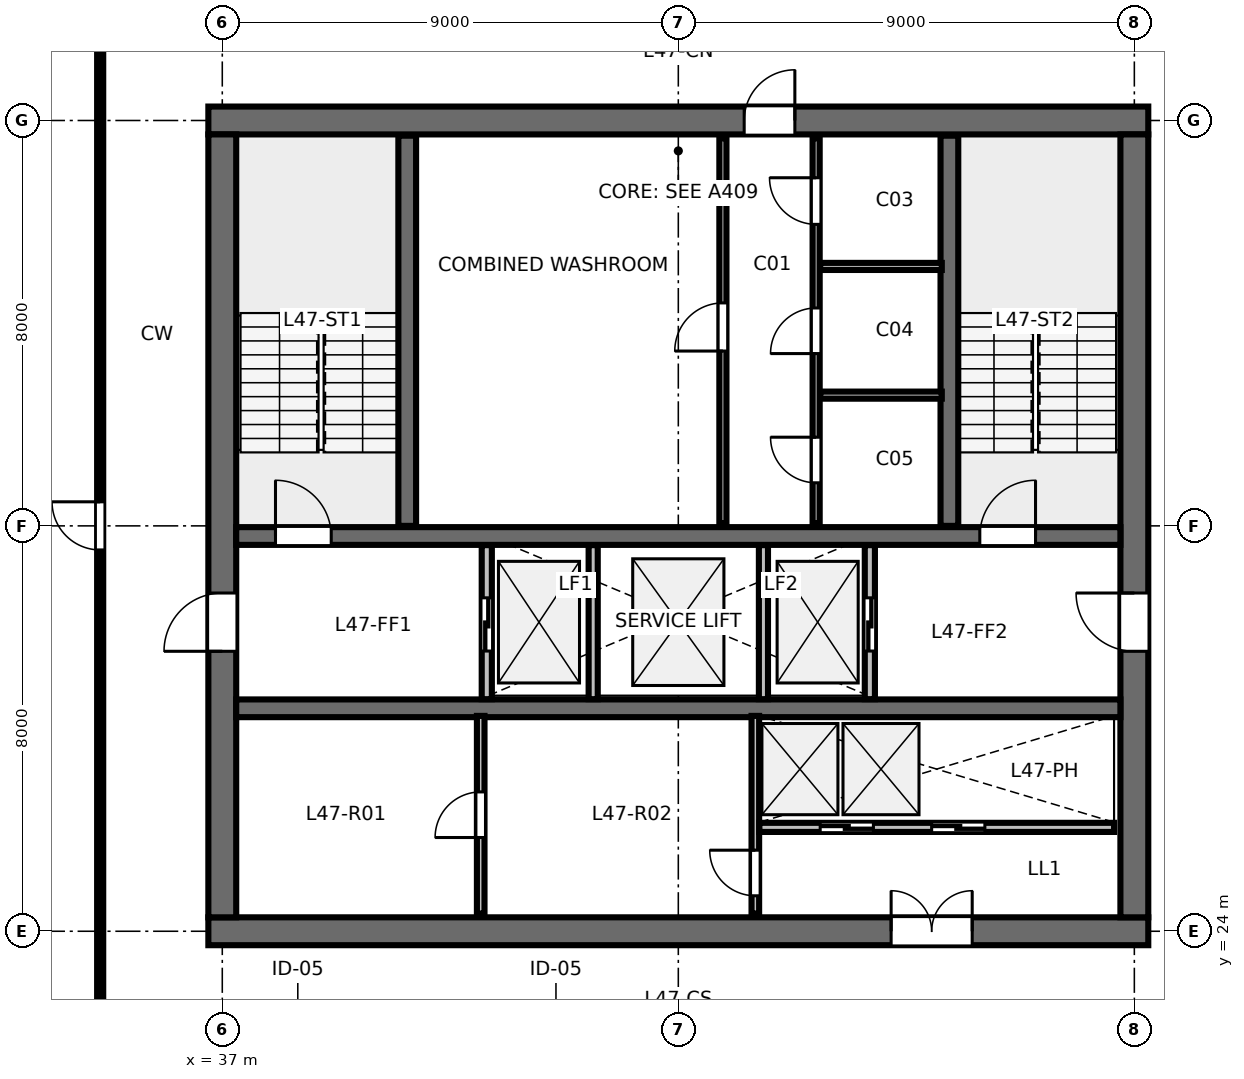
"""IFC4 building model, lengths in metres.
Left out: names, types, materials, properties, quantities, classifications, styles, units other than length and angle.
Written with IfcOpenShell. Run it as: python <this file> out.ifc"""

import sys

from ifc_helpers import new_model, si_unit, direction, frame, frame_2d, origin, place, context, subcontext, project, spatial, rectangle, extrude, element, fill, save


model = new_model("IFC4")
c1 = context("Model", 3, precision=1e-05, world=origin(), true_north=direction((0.0, 1.0)))
c2 = subcontext(c1, "Body", "Model", "MODEL_VIEW")
j1 = project(units=[si_unit("LENGTHUNIT", "METRE"), si_unit("PLANEANGLEUNIT", "RADIAN")], contexts=[c1])
p1 = place(None, origin())
s1 = spatial("IfcSite", under=j1, at=p1, CompositionType="ELEMENT")
p2 = place(p1, origin())
s2 = spatial("IfcBuilding", under=s1, at=p2, CompositionType="ELEMENT")
p3 = place(p2, frame((0.0, 0.0, 180.6)))
s3 = spatial("IfcBuildingStorey", under=s2, at=p3, CompositionType="ELEMENT", Elevation=180.6)
p4 = place(p3, frame((36.725, 24.0, 0.0), z_axis=(0.0, 0.0, 1.0), x_axis=(1.0, 0.0, 0.0)))
e1 = element("IfcWall", 1, at=p4, inside=s3, PredefinedType="SHEAR", context=c2, shape_type="SweptSolid", body=[
    extrude(rectangle(XDim=18.55, YDim=0.55, at=frame_2d((9.275, 0.0))), origin(), (0.0, 0.0, 1.0), 3.36),
])
p5 = place(p4, frame((13.475, 0.0, 0.0)))
e2 = element("IfcOpeningElement", 2, at=p5, cuts=e1, PredefinedType="OPENING", context=c2, shape_type="SweptSolid", body=[
    extrude(rectangle(XDim=1.6, YDim=2.15, at=frame_2d((0.8, 1.075))), frame((0.0, 0.285, 0.0), z_axis=(0.0, -1.0, 0.0), x_axis=(1.0, 0.0, 0.0)), (0.0, 0.0, 1.0), 0.57),
])
p6 = place(p3, frame((36.725, 40.0, 0.0), z_axis=(0.0, 0.0, 1.0), x_axis=(1.0, 0.0, 0.0)))
e3 = element("IfcWall", 3, at=p6, inside=s3, PredefinedType="SHEAR", context=c2, shape_type="SweptSolid", body=[
    extrude(rectangle(XDim=18.55, YDim=0.55, at=frame_2d((9.275, 0.0))), origin(), (0.0, 0.0, 1.0), 3.36),
])
p7 = place(p6, frame((10.575, 0.0, 0.0)))
e4 = element("IfcOpeningElement", 4, at=p7, cuts=e3, PredefinedType="OPENING", context=c2, shape_type="SweptSolid", body=[
    extrude(rectangle(XDim=1.0, YDim=2.15, at=frame_2d((0.5, 1.075))), frame((0.0, 0.285, 0.0), z_axis=(0.0, -1.0, 0.0), x_axis=(1.0, 0.0, 0.0)), (0.0, 0.0, 1.0), 0.57),
])
p8 = place(p3, frame((37.0, 24.275, 0.0), z_axis=(0.0, 0.0, 1.0), x_axis=(0.0, 1.0, 0.0)))
e5 = element("IfcWall", 5, at=p8, inside=s3, PredefinedType="SHEAR", context=c2, shape_type="SweptSolid", body=[
    extrude(rectangle(XDim=15.45, YDim=0.55, at=frame_2d((7.725, 0.0))), origin(), (0.0, 0.0, 1.0), 3.36),
])
p9 = place(p8, frame((5.25, 0.0, 0.0)))
e6 = element("IfcOpeningElement", 6, at=p9, cuts=e5, PredefinedType="OPENING", context=c2, shape_type="SweptSolid", body=[
    extrude(rectangle(XDim=1.15, YDim=2.15, at=frame_2d((0.575, 1.075))), frame((0.0, 0.285, 0.0), z_axis=(0.0, -1.0, 0.0), x_axis=(1.0, 0.0, 0.0)), (0.0, 0.0, 1.0), 0.57),
])
p10 = place(p3, frame((55.0, 24.275, 0.0), z_axis=(0.0, 0.0, 1.0), x_axis=(0.0, 1.0, 0.0)))
e7 = element("IfcWall", 7, at=p10, inside=s3, PredefinedType="SHEAR", context=c2, shape_type="SweptSolid", body=[
    extrude(rectangle(XDim=15.45, YDim=0.55, at=frame_2d((7.725, 0.0))), origin(), (0.0, 0.0, 1.0), 3.36),
])
p11 = place(p10, frame((5.25, 0.0, 0.0)))
e8 = element("IfcOpeningElement", 8, at=p11, cuts=e7, PredefinedType="OPENING", context=c2, shape_type="SweptSolid", body=[
    extrude(rectangle(XDim=1.15, YDim=2.15, at=frame_2d((0.575, 1.075))), frame((0.0, 0.285, 0.0), z_axis=(0.0, -1.0, 0.0), x_axis=(1.0, 0.0, 0.0)), (0.0, 0.0, 1.0), 0.57),
])
p12 = place(p3, frame((37.275, 31.8, 0.0), z_axis=(0.0, 0.0, 1.0), x_axis=(1.0, 0.0, 0.0)))
e9 = element("IfcWall", 9, at=p12, inside=s3, PredefinedType="SHEAR", context=c2, shape_type="SweptSolid", body=[
    extrude(rectangle(XDim=17.45, YDim=0.35, at=frame_2d((8.725, 0.0))), origin(), (0.0, 0.0, 1.0), 3.36),
])
p13 = place(p12, frame((0.775, 0.0, 0.0)))
e10 = element("IfcOpeningElement", 10, at=p13, cuts=e9, PredefinedType="OPENING", context=c2, shape_type="SweptSolid", body=[
    extrude(rectangle(XDim=1.1, YDim=2.15, at=frame_2d((0.55, 1.075))), frame((0.0, 0.185, 0.0), z_axis=(0.0, -1.0, 0.0), x_axis=(1.0, 0.0, 0.0)), (0.0, 0.0, 1.0), 0.37),
])
p14 = place(p12, frame((14.675, 0.0, 0.0)))
e11 = element("IfcOpeningElement", 11, at=p14, cuts=e9, PredefinedType="OPENING", context=c2, shape_type="SweptSolid", body=[
    extrude(rectangle(XDim=1.1, YDim=2.15, at=frame_2d((0.55, 1.075))), frame((0.0, 0.185, 0.0), z_axis=(0.0, -1.0, 0.0), x_axis=(1.0, 0.0, 0.0)), (0.0, 0.0, 1.0), 0.37),
])
p15 = place(p3, frame((37.275, 28.4, 0.0), z_axis=(0.0, 0.0, 1.0), x_axis=(1.0, 0.0, 0.0)))
e12 = element("IfcWall", 12, at=p15, inside=s3, PredefinedType="SHEAR", context=c2, shape_type="SweptSolid", body=[
    extrude(rectangle(XDim=17.45, YDim=0.35, at=frame_2d((8.725, 0.0))), origin(), (0.0, 0.0, 1.0), 3.36),
])
for number, where, z_axis, x_axis in (
    (13, (40.65, 32.0, 0.0), (0.0, 0.0, 1.0), (0.0, 1.0, 0.0)),
    (14, (51.35, 32.0, 0.0), (0.0, 0.0, 1.0), (0.0, 1.0, 0.0)),
):
    element("IfcWall", number, at=place(p3, frame(where, z_axis=z_axis, x_axis=x_axis)), inside=s3, PredefinedType="SHEAR", context=c2, shape_type="SweptSolid", body=[
        extrude(rectangle(XDim=7.7, YDim=0.35, at=frame_2d((3.85, 0.0))), origin(), (0.0, 0.0, 1.0), 3.6),
    ])
p16 = place(p3, frame((46.88, 32.05, 0.0), z_axis=(0.0, 0.0, 1.0), x_axis=(0.0, 1.0, 0.0)))
e15 = element("IfcWall", 15, at=p16, inside=s3, PredefinedType="PARTITIONING", context=c2, shape_type="SweptSolid", body=[
    extrude(rectangle(XDim=7.6, YDim=0.14, at=frame_2d((3.8, 0.0))), origin(), (0.0, 0.0, 1.0), 3.36),
])
p17 = place(p16, frame((3.4, 0.0, 0.0)))
e16 = element("IfcOpeningElement", 16, at=p17, cuts=e15, PredefinedType="OPENING", context=c2, shape_type="SweptSolid", body=[
    extrude(rectangle(XDim=0.95, YDim=2.15, at=frame_2d((0.475, 1.075))), frame((0.0, 0.08, 0.0), z_axis=(0.0, -1.0, 0.0), x_axis=(1.0, 0.0, 0.0)), (0.0, 0.0, 1.0), 0.16),
])
p18 = place(p3, frame((48.72, 32.05, 0.0), z_axis=(0.0, 0.0, 1.0), x_axis=(0.0, 1.0, 0.0)))
e17 = element("IfcWall", 17, at=p18, inside=s3, PredefinedType="PARTITIONING", context=c2, shape_type="SweptSolid", body=[
    extrude(rectangle(XDim=7.6, YDim=0.14, at=frame_2d((3.8, 0.0))), origin(), (0.0, 0.0, 1.0), 3.36),
])
p19 = place(p18, frame((0.8, 0.0, 0.0)))
e18 = element("IfcOpeningElement", 18, at=p19, cuts=e17, PredefinedType="OPENING", context=c2, shape_type="SweptSolid", body=[
    extrude(rectangle(XDim=0.9, YDim=2.15, at=frame_2d((0.45, 1.075))), frame((0.0, 0.08, 0.0), z_axis=(0.0, -1.0, 0.0), x_axis=(1.0, 0.0, 0.0)), (0.0, 0.0, 1.0), 0.16),
])
p20 = place(p18, frame((3.35, 0.0, 0.0)))
e19 = element("IfcOpeningElement", 19, at=p20, cuts=e17, PredefinedType="OPENING", context=c2, shape_type="SweptSolid", body=[
    extrude(rectangle(XDim=0.9, YDim=2.15, at=frame_2d((0.45, 1.075))), frame((0.0, 0.08, 0.0), z_axis=(0.0, -1.0, 0.0), x_axis=(1.0, 0.0, 0.0)), (0.0, 0.0, 1.0), 0.16),
])
p21 = place(p18, frame((5.9, 0.0, 0.0)))
e20 = element("IfcOpeningElement", 20, at=p21, cuts=e17, PredefinedType="OPENING", context=c2, shape_type="SweptSolid", body=[
    extrude(rectangle(XDim=0.92, YDim=2.15, at=frame_2d((0.46, 1.075))), frame((0.0, 0.08, 0.0), z_axis=(0.0, -1.0, 0.0), x_axis=(1.0, 0.0, 0.0)), (0.0, 0.0, 1.0), 0.16),
])
for number, where, z_axis, x_axis in (
    (21, (48.8, 34.58, 0.0), (0.0, 0.0, 1.0), (1.0, 0.0, 0.0)),
    (22, (48.8, 37.12, 0.0), (0.0, 0.0, 1.0), (1.0, 0.0, 0.0)),
):
    element("IfcWall", number, at=place(p3, frame(where, z_axis=z_axis, x_axis=x_axis)), inside=s3, PredefinedType="PARTITIONING", context=c2, shape_type="SweptSolid", body=[
        extrude(rectangle(XDim=2.4, YDim=0.14, at=frame_2d((1.2, 0.0))), origin(), (0.0, 0.0, 1.0), 3.36),
    ])
p22 = place(p3, frame((42.22, 28.58, 0.0), z_axis=(0.0, 0.0, 1.0), x_axis=(0.0, 1.0, 0.0)))
e23 = element("IfcWall", 23, at=p22, inside=s3, PredefinedType="PARTITIONING", context=c2, shape_type="SweptSolid", body=[
    extrude(rectangle(XDim=3.04, YDim=0.2, at=frame_2d((1.52, 0.0))), origin(), (0.0, 0.0, 1.0), 3.36),
])
p23 = place(p22, frame((0.95, 0.0, 0.0)))
e24 = element("IfcOpeningElement", 24, at=p23, cuts=e23, PredefinedType="OPENING", context=c2, shape_type="SweptSolid", body=[
    extrude(rectangle(XDim=1.05, YDim=2.15, at=frame_2d((0.525, 1.075))), frame((0.0, 0.11, 0.0), z_axis=(0.0, -1.0, 0.0), x_axis=(1.0, 0.0, 0.0)), (0.0, 0.0, 1.0), 0.22),
])
p24 = place(p3, frame((49.78, 28.58, 0.0), z_axis=(0.0, 0.0, 1.0), x_axis=(0.0, 1.0, 0.0)))
e25 = element("IfcWall", 25, at=p24, inside=s3, PredefinedType="PARTITIONING", context=c2, shape_type="SweptSolid", body=[
    extrude(rectangle(XDim=3.04, YDim=0.2, at=frame_2d((1.52, 0.0))), origin(), (0.0, 0.0, 1.0), 3.36),
])
p25 = place(p24, frame((0.95, 0.0, 0.0)))
e26 = element("IfcOpeningElement", 26, at=p25, cuts=e25, PredefinedType="OPENING", context=c2, shape_type="SweptSolid", body=[
    extrude(rectangle(XDim=1.05, YDim=2.15, at=frame_2d((0.525, 1.075))), frame((0.0, 0.11, 0.0), z_axis=(0.0, -1.0, 0.0), x_axis=(1.0, 0.0, 0.0)), (0.0, 0.0, 1.0), 0.22),
])
for number, where, z_axis, x_axis in (
    (27, (44.32, 28.58, 0.0), (0.0, 0.0, 1.0), (0.0, 1.0, 0.0)),
    (28, (47.68, 28.58, 0.0), (0.0, 0.0, 1.0), (0.0, 1.0, 0.0)),
):
    element("IfcWall", number, at=place(p3, frame(where, z_axis=z_axis, x_axis=x_axis)), inside=s3, PredefinedType="PARTITIONING", context=c2, shape_type="SweptSolid", body=[
        extrude(rectangle(XDim=3.04, YDim=0.18, at=frame_2d((1.52, 0.0))), origin(), (0.0, 0.0, 1.0), 3.36),
    ])
p26 = place(p3, frame((42.1, 24.35, 0.0), z_axis=(0.0, 0.0, 1.0), x_axis=(0.0, 1.0, 0.0)))
e29 = element("IfcWall", 29, at=p26, inside=s3, PredefinedType="PARTITIONING", context=c2, shape_type="SweptSolid", body=[
    extrude(rectangle(XDim=3.9, YDim=0.15, at=frame_2d((1.95, 0.0))), origin(), (0.0, 0.0, 1.0), 3.36),
])
p27 = place(p26, frame((1.5, 0.0, 0.0)))
e30 = element("IfcOpeningElement", 30, at=p27, cuts=e29, PredefinedType="OPENING", context=c2, shape_type="SweptSolid", body=[
    extrude(rectangle(XDim=0.9, YDim=2.15, at=frame_2d((0.45, 1.075))), frame((0.0, 0.085, 0.0), z_axis=(0.0, -1.0, 0.0), x_axis=(1.0, 0.0, 0.0)), (0.0, 0.0, 1.0), 0.17),
])
p28 = place(p3, frame((47.52, 24.35, 0.0), z_axis=(0.0, 0.0, 1.0), x_axis=(0.0, 1.0, 0.0)))
e31 = element("IfcWall", 31, at=p28, inside=s3, PredefinedType="PARTITIONING", context=c2, shape_type="SweptSolid", body=[
    extrude(rectangle(XDim=3.9, YDim=0.15, at=frame_2d((1.95, 0.0))), origin(), (0.0, 0.0, 1.0), 3.36),
])
p29 = place(p28, frame((0.35, 0.0, 0.0)))
e32 = element("IfcOpeningElement", 32, at=p29, cuts=e31, PredefinedType="OPENING", context=c2, shape_type="SweptSolid", body=[
    extrude(rectangle(XDim=0.9, YDim=2.15, at=frame_2d((0.45, 1.075))), frame((0.0, 0.085, 0.0), z_axis=(0.0, -1.0, 0.0), x_axis=(1.0, 0.0, 0.0)), (0.0, 0.0, 1.0), 0.17),
])
p30 = place(p3, frame((47.6, 26.05, 0.0), z_axis=(0.0, 0.0, 1.0), x_axis=(1.0, 0.0, 0.0)))
e33 = element("IfcWall", 33, at=p30, inside=s3, PredefinedType="PARTITIONING", context=c2, shape_type="SweptSolid", body=[
    extrude(rectangle(XDim=7.0, YDim=0.18, at=frame_2d((3.5, 0.0))), origin(), (0.0, 0.0, 1.0), 3.36),
])
p31 = place(p30, frame((1.2, 0.0, 0.0)))
e34 = element("IfcOpeningElement", 34, at=p31, cuts=e33, PredefinedType="OPENING", context=c2, shape_type="SweptSolid", body=[
    extrude(rectangle(XDim=1.05, YDim=2.15, at=frame_2d((0.525, 1.075))), frame((0.0, 0.1, 0.0), z_axis=(0.0, -1.0, 0.0), x_axis=(1.0, 0.0, 0.0)), (0.0, 0.0, 1.0), 0.2),
])
p32 = place(p30, frame((3.4, 0.0, 0.0)))
e35 = element("IfcOpeningElement", 35, at=p32, cuts=e33, PredefinedType="OPENING", context=c2, shape_type="SweptSolid", body=[
    extrude(rectangle(XDim=1.05, YDim=2.15, at=frame_2d((0.525, 1.075))), frame((0.0, 0.1, 0.0), z_axis=(0.0, -1.0, 0.0), x_axis=(1.0, 0.0, 0.0)), (0.0, 0.0, 1.0), 0.2),
])
p33 = place(p3, frame((34.59, 21.65, 0.0), z_axis=(0.0, 0.0, 1.0), x_axis=(0.0, 1.0, 0.0)))
e36 = element("IfcWall", 36, at=p33, inside=s3, PredefinedType="PARTITIONING", context=c2, shape_type="SweptSolid", body=[
    extrude(rectangle(XDim=20.7, YDim=0.12, at=frame_2d((10.35, 0.0))), origin(), (0.0, 0.0, 1.0), 2.64),
])
p34 = place(p33, frame((9.875, 0.0, 0.0)))
e37 = element("IfcOpeningElement", 37, at=p34, cuts=e36, PredefinedType="OPENING", context=c2, shape_type="SweptSolid", body=[
    extrude(rectangle(XDim=0.95, YDim=2.15, at=frame_2d((0.475, 1.075))), frame((0.0, 0.07, 0.0), z_axis=(0.0, -1.0, 0.0), x_axis=(1.0, 0.0, 0.0)), (0.0, 0.0, 1.0), 0.14),
])
p35 = place(p13, origin())
e38 = element("IfcDoor", 38, at=p35, inside=s3, OperationType="SINGLE_SWING_LEFT", PredefinedType="DOOR", context=c2, shape_type="SweptSolid", body=[
    extrude(rectangle(XDim=1.1, YDim=2.15, at=frame_2d((0.55, 1.075))), frame((0.0, 0.025, 0.0), z_axis=(0.0, -1.0, 0.0), x_axis=(1.0, 0.0, 0.0)), (0.0, 0.0, 1.0), 0.05),
])
fill(e10, e38)
p36 = place(p14, origin())
e39 = element("IfcDoor", 39, at=p36, inside=s3, OperationType="SINGLE_SWING_RIGHT", PredefinedType="DOOR", context=c2, shape_type="SweptSolid", body=[
    extrude(rectangle(XDim=1.1, YDim=2.15, at=frame_2d((0.55, 1.075))), frame((0.0, 0.025, 0.0), z_axis=(0.0, -1.0, 0.0), x_axis=(1.0, 0.0, 0.0)), (0.0, 0.0, 1.0), 0.05),
])
fill(e11, e39)
p37 = place(p7, origin())
e40 = element("IfcDoor", 40, at=p37, inside=s3, OperationType="SINGLE_SWING_RIGHT", PredefinedType="DOOR", context=c2, shape_type="SweptSolid", body=[
    extrude(rectangle(XDim=1.0, YDim=2.15, at=frame_2d((0.5, 1.075))), frame((0.0, 0.025, 0.0), z_axis=(0.0, -1.0, 0.0), x_axis=(1.0, 0.0, 0.0)), (0.0, 0.0, 1.0), 0.05),
])
fill(e4, e40)
p38 = place(p9, origin())
e41 = element("IfcDoor", 41, at=p38, inside=s3, OperationType="SINGLE_SWING_LEFT", PredefinedType="DOOR", context=c2, shape_type="SweptSolid", body=[
    extrude(rectangle(XDim=1.15, YDim=2.15, at=frame_2d((0.575, 1.075))), frame((0.0, 0.025, 0.0), z_axis=(0.0, -1.0, 0.0), x_axis=(1.0, 0.0, 0.0)), (0.0, 0.0, 1.0), 0.05),
])
fill(e6, e41)
p39 = place(p11, origin())
e42 = element("IfcDoor", 42, at=p39, inside=s3, OperationType="SINGLE_SWING_RIGHT", PredefinedType="DOOR", context=c2, shape_type="SweptSolid", body=[
    extrude(rectangle(XDim=1.15, YDim=2.15, at=frame_2d((0.575, 1.075))), frame((0.0, 0.025, 0.0), z_axis=(0.0, -1.0, 0.0), x_axis=(1.0, 0.0, 0.0)), (0.0, 0.0, 1.0), 0.05),
])
fill(e8, e42)
p40 = place(p5, origin())
e43 = element("IfcDoor", 43, at=p40, inside=s3, OperationType="DOUBLE_DOOR_SINGLE_SWING", PredefinedType="DOOR", context=c2, shape_type="SweptSolid", body=[
    extrude(rectangle(XDim=1.6, YDim=2.15, at=frame_2d((0.8, 1.075))), frame((0.0, 0.025, 0.0), z_axis=(0.0, -1.0, 0.0), x_axis=(1.0, 0.0, 0.0)), (0.0, 0.0, 1.0), 0.05),
])
fill(e2, e43)
p41 = place(p17, origin())
e44 = element("IfcDoor", 44, at=p41, inside=s3, OperationType="SINGLE_SWING_LEFT", PredefinedType="DOOR", context=c2, shape_type="SweptSolid", body=[
    extrude(rectangle(XDim=0.95, YDim=2.15, at=frame_2d((0.475, 1.075))), frame((0.0, 0.025, 0.0), z_axis=(0.0, -1.0, 0.0), x_axis=(1.0, 0.0, 0.0)), (0.0, 0.0, 1.0), 0.05),
])
fill(e16, e44)
p42 = place(p19, origin())
e45 = element("IfcDoor", 45, at=p42, inside=s3, OperationType="SINGLE_SWING_RIGHT", PredefinedType="DOOR", context=c2, shape_type="SweptSolid", body=[
    extrude(rectangle(XDim=0.9, YDim=2.15, at=frame_2d((0.45, 1.075))), frame((0.0, 0.025, 0.0), z_axis=(0.0, -1.0, 0.0), x_axis=(1.0, 0.0, 0.0)), (0.0, 0.0, 1.0), 0.05),
])
fill(e18, e45)
p43 = place(p20, origin())
e46 = element("IfcDoor", 46, at=p43, inside=s3, OperationType="SINGLE_SWING_LEFT", PredefinedType="DOOR", context=c2, shape_type="SweptSolid", body=[
    extrude(rectangle(XDim=0.9, YDim=2.15, at=frame_2d((0.45, 1.075))), frame((0.0, 0.025, 0.0), z_axis=(0.0, -1.0, 0.0), x_axis=(1.0, 0.0, 0.0)), (0.0, 0.0, 1.0), 0.05),
])
fill(e19, e46)
p44 = place(p21, origin())
e47 = element("IfcDoor", 47, at=p44, inside=s3, OperationType="SINGLE_SWING_RIGHT", PredefinedType="DOOR", context=c2, shape_type="SweptSolid", body=[
    extrude(rectangle(XDim=0.92, YDim=2.15, at=frame_2d((0.46, 1.075))), frame((0.0, 0.025, 0.0), z_axis=(0.0, -1.0, 0.0), x_axis=(1.0, 0.0, 0.0)), (0.0, 0.0, 1.0), 0.05),
])
fill(e20, e47)
p45 = place(p23, origin())
e48 = element("IfcDoor", 48, at=p45, inside=s3, OperationType="SLIDING_TO_LEFT", PredefinedType="DOOR", context=c2, shape_type="SweptSolid", body=[
    extrude(rectangle(XDim=1.05, YDim=2.15, at=frame_2d((0.525, 1.075))), frame((0.0, 0.025, 0.0), z_axis=(0.0, -1.0, 0.0), x_axis=(1.0, 0.0, 0.0)), (0.0, 0.0, 1.0), 0.05),
])
fill(e24, e48)
p46 = place(p25, origin())
e49 = element("IfcDoor", 49, at=p46, inside=s3, OperationType="SLIDING_TO_RIGHT", PredefinedType="DOOR", context=c2, shape_type="SweptSolid", body=[
    extrude(rectangle(XDim=1.05, YDim=2.15, at=frame_2d((0.525, 1.075))), frame((0.0, 0.025, 0.0), z_axis=(0.0, -1.0, 0.0), x_axis=(1.0, 0.0, 0.0)), (0.0, 0.0, 1.0), 0.05),
])
fill(e26, e49)
p47 = place(p27, origin())
e50 = element("IfcDoor", 50, at=p47, inside=s3, OperationType="SINGLE_SWING_LEFT", PredefinedType="DOOR", context=c2, shape_type="SweptSolid", body=[
    extrude(rectangle(XDim=0.9, YDim=2.15, at=frame_2d((0.45, 1.075))), frame((0.0, 0.025, 0.0), z_axis=(0.0, -1.0, 0.0), x_axis=(1.0, 0.0, 0.0)), (0.0, 0.0, 1.0), 0.05),
])
fill(e30, e50)
p48 = place(p29, origin())
e51 = element("IfcDoor", 51, at=p48, inside=s3, OperationType="SINGLE_SWING_RIGHT", PredefinedType="DOOR", context=c2, shape_type="SweptSolid", body=[
    extrude(rectangle(XDim=0.9, YDim=2.15, at=frame_2d((0.45, 1.075))), frame((0.0, 0.025, 0.0), z_axis=(0.0, -1.0, 0.0), x_axis=(1.0, 0.0, 0.0)), (0.0, 0.0, 1.0), 0.05),
])
fill(e32, e51)
p49 = place(p31, origin())
e52 = element("IfcDoor", 52, at=p49, inside=s3, OperationType="SLIDING_TO_LEFT", PredefinedType="DOOR", context=c2, shape_type="SweptSolid", body=[
    extrude(rectangle(XDim=1.05, YDim=2.15, at=frame_2d((0.525, 1.075))), frame((0.0, 0.025, 0.0), z_axis=(0.0, -1.0, 0.0), x_axis=(1.0, 0.0, 0.0)), (0.0, 0.0, 1.0), 0.05),
])
fill(e34, e52)
p50 = place(p32, origin())
e53 = element("IfcDoor", 53, at=p50, inside=s3, OperationType="SLIDING_TO_RIGHT", PredefinedType="DOOR", context=c2, shape_type="SweptSolid", body=[
    extrude(rectangle(XDim=1.05, YDim=2.15, at=frame_2d((0.525, 1.075))), frame((0.0, 0.025, 0.0), z_axis=(0.0, -1.0, 0.0), x_axis=(1.0, 0.0, 0.0)), (0.0, 0.0, 1.0), 0.05),
])
fill(e35, e53)
p51 = place(p34, origin())
e54 = element("IfcDoor", 54, at=p51, inside=s3, OperationType="SINGLE_SWING_RIGHT", PredefinedType="DOOR", context=c2, shape_type="SweptSolid", body=[
    extrude(rectangle(XDim=0.95, YDim=2.15, at=frame_2d((0.475, 1.075))), frame((0.0, 0.025, 0.0), z_axis=(0.0, -1.0, 0.0), x_axis=(1.0, 0.0, 0.0)), (0.0, 0.0, 1.0), 0.05),
])
fill(e37, e54)
save(model, sys.argv[1])
